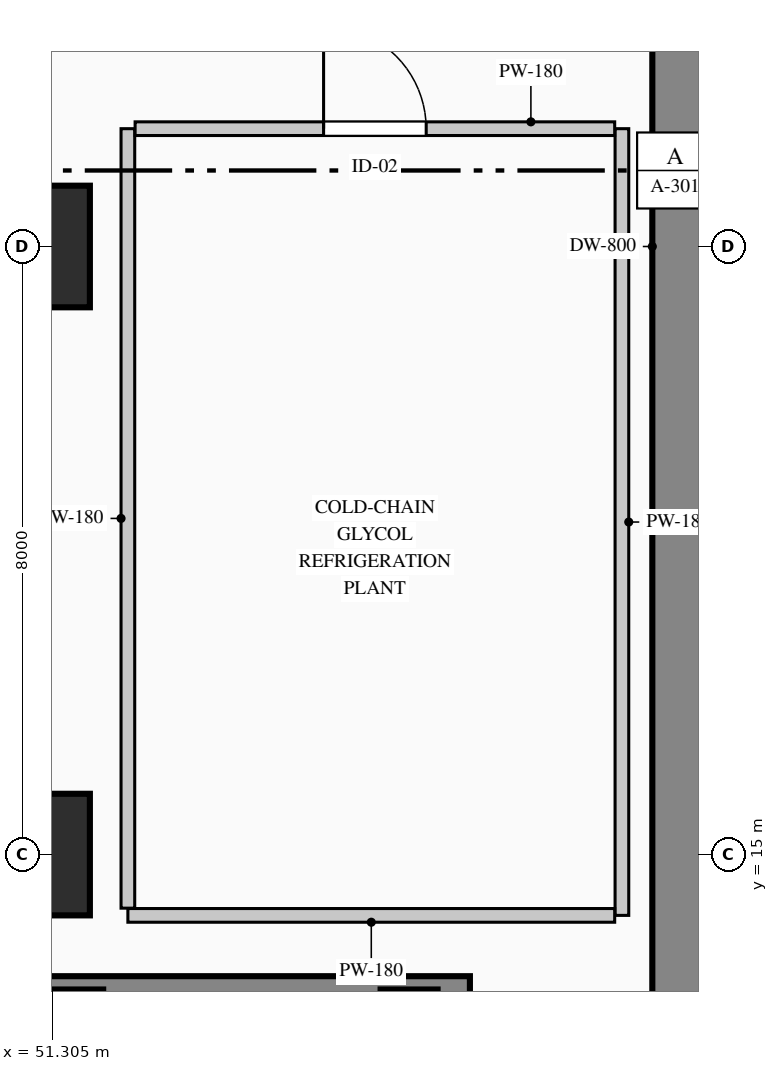
"""IFC4 building model, lengths in metres.
Left out: names, types, materials, properties, quantities, classifications, styles, units other than length and angle.
Written with IfcOpenShell. Run it as: python <this file> out.ifc"""

import sys

from ifc_helpers import new_model, si_unit, direction, frame, frame_2d, origin, origin_2d, place, context, subcontext, project, spatial, rectangle, extrude, element, fill, save


model = new_model("IFC4")
c1 = context("Model", 3, precision=1e-05, world=origin(), true_north=direction((0.0, 1.0)))
c2 = subcontext(c1, "Body", "Model", "MODEL_VIEW")
j1 = project(units=[si_unit("LENGTHUNIT", "METRE"), si_unit("PLANEANGLEUNIT", "RADIAN")], contexts=[c1])
p1 = place(None, origin())
s1 = spatial("IfcSite", under=j1, at=p1, CompositionType="ELEMENT")
p2 = place(p1, origin())
s2 = spatial("IfcBuilding", under=s1, at=p2, CompositionType="ELEMENT")
p3 = place(p2, frame((0.0, 0.0, -9.0)))
s3 = spatial("IfcBuildingStorey", under=s2, at=p3, CompositionType="ELEMENT", Elevation=-9.0)
p4 = place(p3, frame((59.6, 0.8, 0.0), z_axis=(0.0, 0.0, 1.0), x_axis=(0.0, 1.0, 0.0)))
e1 = element("IfcWall", 1, at=p4, inside=s3, PredefinedType="USERDEFINED", context=c2, shape_type="SweptSolid", body=[
    extrude(rectangle(XDim=44.4, YDim=0.8, at=frame_2d((22.2, 0.0))), origin(), (0.0, 0.0, 1.0), 4.5),
])
for number, where, z_axis, x_axis in (
    (2, (51.0, 15.0, 0.0), (0.0, 0.0, 1.0), (1.0, 0.0, 0.0)),
    (3, (51.0, 23.0, 0.0), (0.0, 0.0, 1.0), (1.0, 0.0, 0.0)),
):
    element("IfcColumn", number, at=place(p3, frame(where, z_axis=z_axis, x_axis=x_axis)), inside=s3, PredefinedType="COLUMN", context=c2, shape_type="SweptSolid", body=[
        extrude(rectangle(XDim=1.6, YDim=1.6, at=origin_2d()), origin(), (0.0, 0.0, 1.0), 4.5),
    ])
for number, where, z_axis, x_axis in (
    (4, (51.6, 12.85, 0.0), (0.0, 0.0, 1.0), (1.0, 0.0, 0.0)),
    (5, (56.0, 12.85, 0.0), (0.0, 0.0, 1.0), (1.0, 0.0, 0.0)),
):
    element("IfcColumn", number, at=place(p3, frame(where, z_axis=z_axis, x_axis=x_axis)), inside=s3, PredefinedType="COLUMN", context=c2, shape_type="SweptSolid", body=[
        extrude(rectangle(XDim=0.75, YDim=0.75, at=origin_2d()), origin(), (0.0, 0.0, 1.0), 4.2),
    ])
p5 = place(p3, frame((35.2, 13.25, 0.0), z_axis=(0.0, 0.0, 1.0), x_axis=(1.0, 0.0, 0.0)))
e6 = element("IfcWall", 6, at=p5, inside=s3, PredefinedType="SOLIDWALL", context=c2, shape_type="SweptSolid", body=[
    extrude(rectangle(XDim=21.6, YDim=0.3, at=frame_2d((10.8, 0.0))), origin(), (0.0, 0.0, 1.0), 4.5),
])
p6 = place(p3, frame((58.8, 24.55, 0.0), z_axis=(0.0, 0.0, 1.0), x_axis=(0.0, -1.0, 0.0)))
e7 = element("IfcWall", 7, at=p6, inside=s3, PredefinedType="PARTITIONING", context=c2, shape_type="SweptSolid", body=[
    extrude(rectangle(XDim=10.35, YDim=0.18, at=frame_2d((5.175, 0.0))), origin(), (0.0, 0.0, 1.0), 4.15),
])
p7 = place(p3, frame((58.705, 14.2, 0.0), z_axis=(0.0, 0.0, 1.0), x_axis=(-1.0, 0.0, 0.0)))
e8 = element("IfcWall", 8, at=p7, inside=s3, PredefinedType="PARTITIONING", context=c2, shape_type="SweptSolid", body=[
    extrude(rectangle(XDim=6.405, YDim=0.18, at=frame_2d((3.203, 0.0))), origin(), (0.0, 0.0, 1.0), 4.15),
])
p8 = place(p3, frame((52.3, 14.295, 0.0), z_axis=(0.0, 0.0, 1.0), x_axis=(0.0, 1.0, 0.0)))
e9 = element("IfcWall", 9, at=p8, inside=s3, PredefinedType="PARTITIONING", context=c2, shape_type="SweptSolid", body=[
    extrude(rectangle(XDim=10.255, YDim=0.18, at=frame_2d((5.127, 0.0))), origin(), (0.0, 0.0, 1.0), 4.15),
])
p9 = place(p3, frame((52.395, 24.55, 0.0), z_axis=(0.0, 0.0, 1.0), x_axis=(1.0, 0.0, 0.0)))
e10 = element("IfcWall", 10, at=p9, inside=s3, PredefinedType="PARTITIONING", context=c2, shape_type="SweptSolid", body=[
    extrude(rectangle(XDim=6.31, YDim=0.18, at=frame_2d((3.155, 0.0))), origin(), (0.0, 0.0, 1.0), 3.685),
])
p10 = place(p9, frame((2.48, 0.0, 0.0)))
e11 = element("IfcOpeningElement", 11, at=p10, cuts=e10, PredefinedType="OPENING", context=c2, shape_type="SweptSolid", body=[
    extrude(rectangle(XDim=1.35, YDim=2.2, at=frame_2d((0.675, 1.1))), frame((0.0, 0.1, 0.0), z_axis=(0.0, -1.0, 0.0), x_axis=(1.0, 0.0, 0.0)), (0.0, 0.0, 1.0), 0.2),
])
p11 = place(p10, origin())
e12 = element("IfcDoor", 12, at=p11, inside=s3, OperationType="SINGLE_SWING_LEFT", PredefinedType="DOOR", context=c2, shape_type="SweptSolid", body=[
    extrude(rectangle(XDim=1.35, YDim=2.2, at=frame_2d((0.675, 1.1))), frame((0.0, 0.025, 0.0), z_axis=(0.0, -1.0, 0.0), x_axis=(1.0, 0.0, 0.0)), (0.0, 0.0, 1.0), 0.05),
])
fill(e11, e12)
save(model, sys.argv[1])
